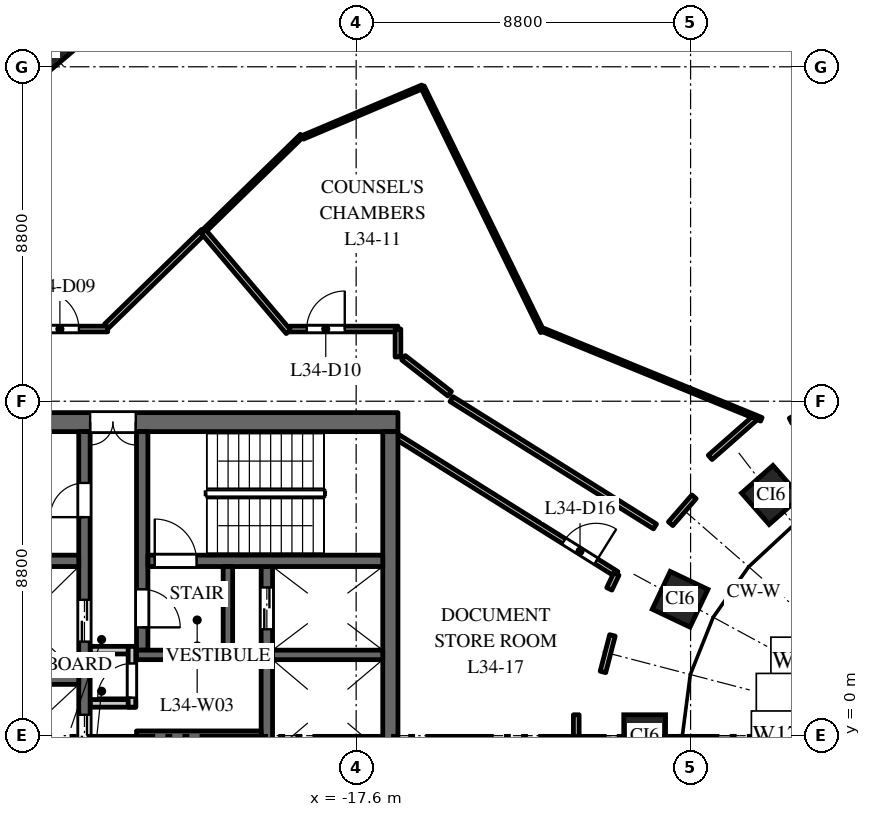
"""IFC4 building model, lengths in metres.
Left out: names, types, materials, properties, quantities, classifications, styles, units other than length and angle.
Written with IfcOpenShell. Run it as: python <this file> out.ifc"""

import sys

from ifc_helpers import new_model, si_unit, direction, frame, frame_2d, origin, origin_2d, place, context, subcontext, project, spatial, rectangle, extrude, element, fill, save


model = new_model("IFC4")
c1 = context("Model", 3, precision=1e-05, world=origin(), true_north=direction((0.0, 1.0)))
c2 = subcontext(c1, "Body", "Model", "MODEL_VIEW")
j1 = project(units=[si_unit("LENGTHUNIT", "METRE"), si_unit("PLANEANGLEUNIT", "RADIAN")], contexts=[c1])
p1 = place(None, origin())
s1 = spatial("IfcSite", under=j1, at=p1, CompositionType="ELEMENT")
p2 = place(p1, origin())
s2 = spatial("IfcBuilding", under=s1, at=p2, CompositionType="ELEMENT")
p3 = place(p2, frame((0.0, 0.0, 150.0)))
s3 = spatial("IfcBuildingStorey", under=s2, at=p3, CompositionType="ELEMENT", Elevation=150.0)
p4 = place(p3, frame((-25.783, 18.18, 0.0), z_axis=(0.0, 0.0, 1.0), x_axis=(-0.763035199656, -0.646356932419, 0.0)))
e1 = element("IfcColumn", 1, at=p4, inside=s3, PredefinedType="COLUMN", context=c2, shape_type="SweptSolid", body=[
    extrude(rectangle(XDim=1.2, YDim=1.2, at=origin_2d()), origin(), (0.0, 0.0, 1.0), 4.0),
])
for number, where, z_axis, x_axis in (
    (2, (-6.682, 6.334, 0.0), (0.0, 0.0, 1.0), (-0.751, -0.66, 0.0)),
    (3, (-9.076, 3.588, 0.0), (0.0, 0.0, 1.0), (-0.429, -0.903, 0.0)),
    (4, (-10.008, 0.0, 0.0), (0.0, 0.0, 1.0), (0.0, -1.0, 0.0)),
):
    element("IfcColumn", number, at=place(p3, frame(where, z_axis=z_axis, x_axis=x_axis)), inside=s3, PredefinedType="COLUMN", context=c2, shape_type="SweptSolid", body=[
        extrude(rectangle(XDim=1.1, YDim=1.1, at=origin_2d()), origin(), (0.0, 0.0, 1.0), 4.0),
    ])
p5 = place(p3, frame((-16.5, 8.25, 0.0), z_axis=(0.0, 0.0, 1.0), x_axis=(-1.0, 0.0, 0.0)))
e5 = element("IfcWall", 5, at=p5, inside=s3, PredefinedType="SHEAR", context=c2, shape_type="SweptSolid", body=[
    extrude(rectangle(XDim=15.0, YDim=0.5, at=frame_2d((7.5, 0.0))), origin(), (0.0, 0.0, 1.0), 3.7),
])
p6 = place(p5, frame((6.9, 0.0, 0.0)))
e6 = element("IfcOpeningElement", 6, at=p6, cuts=e5, PredefinedType="OPENING", context=c2, shape_type="SweptSolid", body=[
    extrude(rectangle(XDim=1.2, YDim=2.1, at=frame_2d((0.6, 1.05))), frame((0.0, 0.26, 0.0), z_axis=(0.0, -1.0, 0.0), x_axis=(1.0, 0.0, 0.0)), (0.0, 0.0, 1.0), 0.52),
])
p7 = place(p5, frame((12.425, 0.0, 0.0)))
e7 = element("IfcOpeningElement", 7, at=p7, cuts=e5, PredefinedType="OPENING", context=c2, shape_type="SweptSolid", body=[
    extrude(rectangle(XDim=0.9, YDim=2.1, at=frame_2d((0.45, 1.05))), frame((0.0, 0.26, 0.0), z_axis=(0.0, -1.0, 0.0), x_axis=(1.0, 0.0, 0.0)), (0.0, 0.0, 1.0), 0.52),
])
p8 = place(p3, frame((-19.95, -4.45, 0.0), z_axis=(0.0, 0.0, 1.0), x_axis=(0.0, 1.0, 0.0)))
e8 = element("IfcWall", 8, at=p8, inside=s3, PredefinedType="SHEAR", context=c2, shape_type="SweptSolid", body=[
    extrude(rectangle(XDim=8.9, YDim=0.3, at=frame_2d((4.45, 0.0))), origin(), (0.0, 0.0, 1.0), 3.7),
])
p9 = place(p8, frame((0.775, 0.0, 0.0)))
e9 = element("IfcOpeningElement", 9, at=p9, cuts=e8, PredefinedType="OPENING", context=c2, shape_type="SweptSolid", body=[
    extrude(rectangle(XDim=1.2, YDim=2.1, at=frame_2d((0.6, 1.05))), frame((0.0, 0.16, 0.0), z_axis=(0.0, -1.0, 0.0), x_axis=(1.0, 0.0, 0.0)), (0.0, 0.0, 1.0), 0.32),
])
p10 = place(p8, frame((7.25, 0.0, 0.0)))
e10 = element("IfcOpeningElement", 10, at=p10, cuts=e8, PredefinedType="OPENING", context=c2, shape_type="SweptSolid", body=[
    extrude(rectangle(XDim=1.1, YDim=2.1, at=frame_2d((0.55, 1.05))), frame((0.0, 0.16, 0.0), z_axis=(0.0, -1.0, 0.0), x_axis=(1.0, 0.0, 0.0)), (0.0, 0.0, 1.0), 0.32),
])
p11 = place(p3, frame((-24.75, -8.0, 0.0), z_axis=(0.0, 0.0, 1.0), x_axis=(0.0, 1.0, 0.0)))
e11 = element("IfcWall", 11, at=p11, inside=s3, PredefinedType="SHEAR", context=c2, shape_type="SweptSolid", body=[
    extrude(rectangle(XDim=16.0, YDim=0.3, at=frame_2d((8.0, 0.0))), origin(), (0.0, 0.0, 1.0), 3.7),
])
p12 = place(p11, frame((4.425, 0.0, 0.0)))
e12 = element("IfcOpeningElement", 12, at=p12, cuts=e11, PredefinedType="OPENING", context=c2, shape_type="SweptSolid", body=[
    extrude(rectangle(XDim=1.1, YDim=2.1, at=frame_2d((0.55, 1.05))), frame((0.0, 0.16, 0.0), z_axis=(0.0, -1.0, 0.0), x_axis=(1.0, 0.0, 0.0)), (0.0, 0.0, 1.0), 0.32),
])
p13 = place(p11, frame((7.45, 0.0, 0.0)))
e13 = element("IfcOpeningElement", 13, at=p13, cuts=e11, PredefinedType="OPENING", context=c2, shape_type="SweptSolid", body=[
    extrude(rectangle(XDim=1.1, YDim=2.1, at=frame_2d((0.55, 1.05))), frame((0.0, 0.16, 0.0), z_axis=(0.0, -1.0, 0.0), x_axis=(1.0, 0.0, 0.0)), (0.0, 0.0, 1.0), 0.32),
])
p14 = place(p11, frame((10.475, 0.0, 0.0)))
e14 = element("IfcOpeningElement", 14, at=p14, cuts=e11, PredefinedType="OPENING", context=c2, shape_type="SweptSolid", body=[
    extrude(rectangle(XDim=1.1, YDim=2.1, at=frame_2d((0.55, 1.05))), frame((0.0, 0.16, 0.0), z_axis=(0.0, -1.0, 0.0), x_axis=(1.0, 0.0, 0.0)), (0.0, 0.0, 1.0), 0.32),
])
p15 = place(p11, frame((13.75, 0.0, 0.0)))
e15 = element("IfcOpeningElement", 15, at=p15, cuts=e11, PredefinedType="OPENING", context=c2, shape_type="SweptSolid", body=[
    extrude(rectangle(XDim=0.9, YDim=2.1, at=frame_2d((0.45, 1.05))), frame((0.0, 0.16, 0.0), z_axis=(0.0, -1.0, 0.0), x_axis=(1.0, 0.0, 0.0)), (0.0, 0.0, 1.0), 0.32),
])
p16 = place(p11, frame((1.975, 0.0, 0.0)))
e16 = element("IfcOpeningElement", 16, at=p16, cuts=e11, PredefinedType="OPENING", context=c2, shape_type="SweptSolid", body=[
    extrude(rectangle(XDim=0.9, YDim=2.1, at=frame_2d((0.45, 1.05))), frame((0.0, 0.16, 0.0), z_axis=(0.0, -1.0, 0.0), x_axis=(1.0, 0.0, 0.0)), (0.0, 0.0, 1.0), 0.32),
])
p17 = place(p11, frame((0.35, 0.0, 0.0)))
e17 = element("IfcOpeningElement", 17, at=p17, cuts=e11, PredefinedType="OPENING", context=c2, shape_type="SweptSolid", body=[
    extrude(rectangle(XDim=0.9, YDim=2.1, at=frame_2d((0.45, 1.05))), frame((0.0, 0.16, 0.0), z_axis=(0.0, -1.0, 0.0), x_axis=(1.0, 0.0, 0.0)), (0.0, 0.0, 1.0), 0.32),
])
p18 = place(p3, frame((-20.1, 0.0, 0.0), z_axis=(0.0, 0.0, 1.0), x_axis=(-1.0, 0.0, 0.0)))
e18 = element("IfcWall", 18, at=p18, inside=s3, PredefinedType="SHEAR", context=c2, shape_type="SweptSolid", body=[
    extrude(rectangle(XDim=3.28, YDim=0.25, at=frame_2d((1.64, 0.0))), origin(), (0.0, 0.0, 1.0), 3.7),
])
p19 = place(p3, frame((-16.7, -8.0, 0.0), z_axis=(0.0, 0.0, 1.0), x_axis=(0.0, 1.0, 0.0)))
e19 = element("IfcWall", 19, at=p19, inside=s3, PredefinedType="SHEAR", context=c2, shape_type="SweptSolid", body=[
    extrude(rectangle(XDim=16.0, YDim=0.4, at=frame_2d((8.0, 0.0))), origin(), (0.0, 0.0, 1.0), 3.7),
])
for number, where, z_axis, x_axis in (
    (20, (-23.4, 0.85, 0.0), (0.0, 0.0, 1.0), (-1.0, 0.0, 0.0)),
    (21, (-23.4, 2.25, 0.0), (0.0, 0.0, 1.0), (-1.0, 0.0, 0.0)),
):
    element("IfcWall", number, at=place(p3, frame(where, z_axis=z_axis, x_axis=x_axis)), inside=s3, PredefinedType="PARTITIONING", context=c2, shape_type="SweptSolid", body=[
        extrude(rectangle(XDim=1.2, YDim=0.2, at=frame_2d((0.6, 0.0))), origin(), (0.0, 0.0, 1.0), 3.7),
    ])
p20 = place(p3, frame((-23.5, 0.75, 0.0), z_axis=(0.0, 0.0, 1.0), x_axis=(0.0, 1.0, 0.0)))
e22 = element("IfcWall", 22, at=p20, inside=s3, PredefinedType="PARTITIONING", context=c2, shape_type="SweptSolid", body=[
    extrude(rectangle(XDim=1.6, YDim=0.2, at=frame_2d((0.8, 0.0))), origin(), (0.0, 0.0, 1.0), 3.7),
])
p21 = place(p20, frame((0.25, 0.0, 0.0)))
e23 = element("IfcOpeningElement", 23, at=p21, cuts=e22, PredefinedType="OPENING", context=c2, shape_type="SweptSolid", body=[
    extrude(rectangle(XDim=0.9, YDim=2.1, at=frame_2d((0.45, 1.05))), frame((0.0, 0.11, 0.0), z_axis=(0.0, -1.0, 0.0), x_axis=(1.0, 0.0, 0.0)), (0.0, 0.0, 1.0), 0.22),
])
p22 = place(p3, frame((-24.9, 4.6, 0.0), z_axis=(0.0, 0.0, 1.0), x_axis=(-1.0, 0.0, 0.0)))
e24 = element("IfcWall", 24, at=p22, inside=s3, PredefinedType="SHEAR", context=c2, shape_type="SweptSolid", body=[
    extrude(rectangle(XDim=6.1, YDim=0.3, at=frame_2d((3.05, 0.0))), origin(), (0.0, 0.0, 1.0), 3.7),
])
p23 = place(p22, frame((4.2, 0.0, 0.0)))
e25 = element("IfcOpeningElement", 25, at=p23, cuts=e24, PredefinedType="OPENING", context=c2, shape_type="SweptSolid", body=[
    extrude(rectangle(XDim=0.9, YDim=2.1, at=frame_2d((0.45, 1.05))), frame((0.0, 0.16, 0.0), z_axis=(0.0, -1.0, 0.0), x_axis=(1.0, 0.0, 0.0)), (0.0, 0.0, 1.0), 0.32),
])
for number, where, z_axis, x_axis in (
    (26, (-16.9, 2.125, 0.0), (0.0, 0.0, 1.0), (-1.0, 0.0, 0.0)),
    (27, (-24.9, 1.475, 0.0), (0.0, 0.0, 1.0), (-1.0, 0.0, 0.0)),
):
    element("IfcWall", number, at=place(p3, frame(where, z_axis=z_axis, x_axis=x_axis)), inside=s3, PredefinedType="SHEAR", context=c2, shape_type="SweptSolid", body=[
        extrude(rectangle(XDim=2.9, YDim=0.25, at=frame_2d((1.45, 0.0))), origin(), (0.0, 0.0, 1.0), 3.7),
    ])
p24 = place(p3, frame((-23.23, 2.25, 0.0), z_axis=(0.0, 0.0, 1.0), x_axis=(0.0, 1.0, 0.0)))
e28 = element("IfcWall", 28, at=p24, inside=s3, PredefinedType="SHEAR", context=c2, shape_type="SweptSolid", body=[
    extrude(rectangle(XDim=5.75, YDim=0.3, at=frame_2d((2.875, 0.0))), origin(), (0.0, 0.0, 1.0), 3.7),
])
p25 = place(p24, frame((0.6, 0.0, 0.0)))
e29 = element("IfcOpeningElement", 29, at=p25, cuts=e28, PredefinedType="OPENING", context=c2, shape_type="SweptSolid", body=[
    extrude(rectangle(XDim=1.0, YDim=2.1, at=frame_2d((0.5, 1.05))), frame((0.0, 0.16, 0.0), z_axis=(0.0, -1.0, 0.0), x_axis=(1.0, 0.0, 0.0)), (0.0, 0.0, 1.0), 0.32),
])
p26 = place(p3, frame((-16.9, 4.6, 0.0), z_axis=(0.0, 0.0, 1.0), x_axis=(-1.0, 0.0, 0.0)))
e30 = element("IfcWall", 30, at=p26, inside=s3, PredefinedType="SHEAR", context=c2, shape_type="SweptSolid", body=[
    extrude(rectangle(XDim=6.18, YDim=0.3, at=frame_2d((3.09, 0.0))), origin(), (0.0, 0.0, 1.0), 3.7),
])
p27 = place(p26, frame((4.9, 0.0, 0.0)))
e31 = element("IfcOpeningElement", 31, at=p27, cuts=e30, PredefinedType="OPENING", context=c2, shape_type="SweptSolid", body=[
    extrude(rectangle(XDim=1.1, YDim=2.1, at=frame_2d((0.55, 1.05))), frame((0.0, 0.16, 0.0), z_axis=(0.0, -1.0, 0.0), x_axis=(1.0, 0.0, 0.0)), (0.0, 0.0, 1.0), 0.32),
])
p28 = place(p3, frame((-20.85, 2.125, 0.0), z_axis=(0.0, 0.0, 1.0), x_axis=(-1.0, 0.0, 0.0)))
e32 = element("IfcWall", 32, at=p28, inside=s3, PredefinedType="SHEAR", context=c2, shape_type="SweptSolid", body=[
    extrude(rectangle(XDim=2.53, YDim=0.25, at=frame_2d((1.265, 0.0))), origin(), (0.0, 0.0, 1.0), 3.7),
])
p29 = place(p3, frame((-20.975, 2.25, 0.0), z_axis=(0.0, 0.0, 1.0), x_axis=(0.0, 1.0, 0.0)))
e33 = element("IfcWall", 33, at=p29, inside=s3, PredefinedType="SHEAR", context=c2, shape_type="SweptSolid", body=[
    extrude(rectangle(XDim=2.2, YDim=0.25, at=frame_2d((1.1, 0.0))), origin(), (0.0, 0.0, 1.0), 3.7),
])
p30 = place(p3, frame((-31.5, 10.7, 0.0), z_axis=(0.0, 0.0, 1.0), x_axis=(1.0, 0.0, 0.0)))
e34 = element("IfcWall", 34, at=p30, inside=s3, PredefinedType="PARTITIONING", context=c2, shape_type="SweptSolid", body=[
    extrude(rectangle(XDim=7.361, YDim=0.15, at=frame_2d((3.681, 0.0))), origin(), (0.0, 0.0, 1.0), 3.1),
])
p31 = place(p30, frame((5.604, 0.0, 0.0)))
e35 = element("IfcOpeningElement", 35, at=p31, cuts=e34, PredefinedType="OPENING", context=c2, shape_type="SweptSolid", body=[
    extrude(rectangle(XDim=1.0, YDim=2.1, at=frame_2d((0.5, 1.05))), frame((0.0, 0.085, 0.0), z_axis=(0.0, -1.0, 0.0), x_axis=(1.0, 0.0, 0.0)), (0.0, 0.0, 1.0), 0.17),
])
p32 = place(p3, frame((-24.166, 10.778, 0.0), z_axis=(0.0, 0.0, 1.0), x_axis=(0.715930732039, 0.698171316313, 0.0)))
e36 = element("IfcWall", 36, at=p32, inside=s3, PredefinedType="PARTITIONING", context=c2, shape_type="SweptSolid", body=[
    extrude(rectangle(XDim=3.561, YDim=0.15, at=frame_2d((1.78, 0.0))), origin(), (0.0, 0.0, 1.0), 3.7),
])
p33 = place(p3, frame((-21.618, 13.265, 0.0), z_axis=(0.0, 0.0, 1.0), x_axis=(0.716003517179, 0.69809667195, 0.0)))
e37 = element("IfcWall", 37, at=p33, inside=s3, PredefinedType="PARTITIONING", context=c2, shape_type="SweptSolid", body=[
    extrude(rectangle(XDim=3.613, YDim=0.1, at=frame_2d((1.807, 0.0))), origin(), (0.0, 0.0, 1.0), 2.75),
])
p34 = place(p3, frame((-21.617, 13.264, 0.0), z_axis=(0.0, 0.0, 1.0), x_axis=(0.646521695402, -0.762895600574, 0.0)))
e38 = element("IfcWall", 38, at=p34, inside=s3, PredefinedType="PARTITIONING", context=c2, shape_type="SweptSolid", body=[
    extrude(rectangle(XDim=3.455, YDim=0.15, at=frame_2d((1.728, 0.0))), origin(), (0.0, 0.0, 1.0), 3.7),
])
p35 = place(p3, frame((-19.347, 10.7, 0.0), z_axis=(0.0, 0.0, 1.0), x_axis=(1.0, 0.0, 0.0)))
e39 = element("IfcWall", 39, at=p35, inside=s3, PredefinedType="PARTITIONING", context=c2, shape_type="SweptSolid", body=[
    extrude(rectangle(XDim=2.847, YDim=0.15, at=frame_2d((1.423, 0.0))), origin(), (0.0, 0.0, 1.0), 3.7),
])
p36 = place(p35, frame((0.447, 0.0, 0.0)))
e40 = element("IfcOpeningElement", 40, at=p36, cuts=e39, PredefinedType="OPENING", context=c2, shape_type="SweptSolid", body=[
    extrude(rectangle(XDim=1.0, YDim=2.1, at=frame_2d((0.5, 1.05))), frame((0.0, 0.085, 0.0), z_axis=(0.0, -1.0, 0.0), x_axis=(1.0, 0.0, 0.0)), (0.0, 0.0, 1.0), 0.17),
])
p37 = place(p3, frame((-19.003, 15.744, 0.0), z_axis=(0.0, 0.0, 1.0), x_axis=(0.921193815687, 0.389104039995, 0.0)))
e41 = element("IfcWall", 41, at=p37, inside=s3, PredefinedType="PARTITIONING", context=c2, shape_type="SweptSolid", body=[
    extrude(rectangle(XDim=3.418, YDim=0.1, at=frame_2d((1.709, 0.0))), origin(), (0.0, 0.0, 1.0), 3.7),
])
p38 = place(p3, frame((-16.5, 9.964, 0.0), z_axis=(0.0, 0.0, 1.0), x_axis=(0.0, 1.0, 0.0)))
e42 = element("IfcWall", 42, at=p38, inside=s3, PredefinedType="PARTITIONING", context=c2, shape_type="SweptSolid", body=[
    extrude(rectangle(XDim=0.736, YDim=0.15, at=frame_2d((0.368, 0.0))), origin(), (0.0, 0.0, 1.0), 3.7),
])
p39 = place(p3, frame((-15.854, 17.074, 0.0), z_axis=(0.0, 0.0, 1.0), x_axis=(0.439232714934, -0.898373320024, 0.0)))
e43 = element("IfcWall", 43, at=p39, inside=s3, PredefinedType="PARTITIONING", context=c2, shape_type="SweptSolid", body=[
    extrude(rectangle(XDim=7.174, YDim=0.1, at=frame_2d((3.587, 0.0))), origin(), (0.0, 0.0, 1.0), 3.7),
])
p40 = place(p3, frame((-16.5, 7.851, 0.0), z_axis=(0.0, 0.0, 1.0), x_axis=(0.847690706888, -0.530490777917, 0.0)))
e44 = element("IfcWall", 44, at=p40, inside=s3, PredefinedType="PARTITIONING", context=c2, shape_type="SweptSolid", body=[
    extrude(rectangle(XDim=6.781, YDim=0.15, at=frame_2d((3.39, 0.0))), origin(), (0.0, 0.0, 1.0), 3.7),
])
p41 = place(p40, frame((5.151, 0.0, 0.0)))
e45 = element("IfcOpeningElement", 45, at=p41, cuts=e44, PredefinedType="OPENING", context=c2, shape_type="SweptSolid", body=[
    extrude(rectangle(XDim=1.0, YDim=2.1, at=frame_2d((0.5, 1.05))), frame((0.0, 0.085, 0.0), z_axis=(0.0, -1.0, 0.0), x_axis=(1.0, 0.0, 0.0)), (0.0, 0.0, 1.0), 0.17),
])
p42 = place(p3, frame((-15.089, 8.856, 0.0), z_axis=(0.0, 0.0, 1.0), x_axis=(0.847611500167, -0.53061732424, 0.0)))
e46 = element("IfcWall", 46, at=p42, inside=s3, PredefinedType="PARTITIONING", context=c2, shape_type="SweptSolid", body=[
    extrude(rectangle(XDim=6.315, YDim=0.15, at=frame_2d((3.158, 0.0))), origin(), (0.0, 0.0, 1.0), 3.7),
])
p43 = place(p3, frame((-12.666, 10.669, 0.0), z_axis=(0.0, 0.0, 1.0), x_axis=(0.925451421732, -0.378866290416, 0.0)))
e47 = element("IfcWall", 47, at=p43, inside=s3, PredefinedType="PARTITIONING", context=c2, shape_type="SweptSolid", body=[
    extrude(rectangle(XDim=6.189, YDim=0.1, at=frame_2d((3.095, 0.0))), origin(), (0.0, 0.0, 1.0), 3.7),
])
p44 = place(p3, frame((-11.808, -0.55, 0.0), z_axis=(0.0, 0.0, 1.0), x_axis=(0.0, 1.0, 0.0)))
e48 = element("IfcWall", 48, at=p44, inside=s3, PredefinedType="PARTITIONING", context=c2, shape_type="SweptSolid", body=[
    extrude(rectangle(XDim=1.1, YDim=0.15, at=frame_2d((0.55, 0.0))), origin(), (0.0, 0.0, 1.0), 3.7),
])
p45 = place(p3, frame((-11.106, 1.677, 0.0), z_axis=(0.0, 0.0, 1.0), x_axis=(0.251541813796, 0.967846431988, 0.0)))
e49 = element("IfcWall", 49, at=p45, inside=s3, PredefinedType="PARTITIONING", context=c2, shape_type="SweptSolid", body=[
    extrude(rectangle(XDim=0.994, YDim=0.15, at=frame_2d((0.497, 0.0))), origin(), (0.0, 0.0, 1.0), 3.7),
])
p46 = place(p3, frame((-10.938, 3.863, 0.0), z_axis=(0.0, 0.0, 1.0), x_axis=(0.429758433873, 0.90294390109, 0.0)))
e50 = element("IfcWall", 50, at=p46, inside=s3, PredefinedType="PARTITIONING", context=c2, shape_type="SweptSolid", body=[
    extrude(rectangle(XDim=0.433, YDim=0.15, at=frame_2d((0.216, 0.0))), origin(), (0.0, 0.0, 1.0), 3.7),
])
p47 = place(p3, frame((-9.325, 5.577, 0.0), z_axis=(0.0, 0.0, 1.0), x_axis=(0.656365478363, 0.754443078578, 0.0)))
e51 = element("IfcWall", 51, at=p47, inside=s3, PredefinedType="PARTITIONING", context=c2, shape_type="SweptSolid", body=[
    extrude(rectangle(XDim=0.938, YDim=0.15, at=frame_2d((0.469, 0.0))), origin(), (0.0, 0.0, 1.0), 2.75),
])
p48 = place(p3, frame((-8.284, 7.322, 0.0), z_axis=(0.0, 0.0, 1.0), x_axis=(0.750666784408, 0.660680996235, 0.0)))
e52 = element("IfcWall", 52, at=p48, inside=s3, PredefinedType="PARTITIONING", context=c2, shape_type="SweptSolid", body=[
    extrude(rectangle(XDim=1.555, YDim=0.15, at=frame_2d((0.777, 0.0))), origin(), (0.0, 0.0, 1.0), 3.7),
])
p49 = place(p3, frame((-6.168, 8.287, 0.0), z_axis=(0.0, 0.0, 1.0), x_axis=(0.889398654128, 0.457132403178, 0.0)))
e53 = element("IfcWall", 53, at=p49, inside=s3, PredefinedType="PARTITIONING", context=c2, shape_type="SweptSolid", body=[
    extrude(rectangle(XDim=0.844, YDim=0.15, at=frame_2d((0.422, 0.0))), origin(), (0.0, 0.0, 1.0), 3.7),
])
p50 = place(p3, frame((-16.352, 9.942, 0.0), z_axis=(0.0, 0.0, 1.0), x_axis=(0.788950226826, -0.614457109643, 0.0)))
e54 = element("IfcWall", 54, at=p50, inside=s3, PredefinedType="PARTITIONING", context=c2, shape_type="SweptSolid", body=[
    extrude(rectangle(XDim=1.538, YDim=0.15, at=frame_2d((0.769, 0.0))), origin(), (0.0, 0.0, 1.0), 3.7),
])
p51 = place(p10, origin())
e55 = element("IfcDoor", 55, at=p51, inside=s3, OperationType="DOUBLE_DOOR_SLIDING", PredefinedType="DOOR", context=c2, shape_type="SweptSolid", body=[
    extrude(rectangle(XDim=1.1, YDim=2.1, at=frame_2d((0.55, 1.05))), frame((0.0, 0.025, 0.0), z_axis=(0.0, -1.0, 0.0), x_axis=(1.0, 0.0, 0.0)), (0.0, 0.0, 1.0), 0.05),
])
fill(e10, e55)
p52 = place(p13, origin())
e56 = element("IfcDoor", 56, at=p52, inside=s3, OperationType="DOUBLE_DOOR_SLIDING", PredefinedType="DOOR", context=c2, shape_type="SweptSolid", body=[
    extrude(rectangle(XDim=1.1, YDim=2.1, at=frame_2d((0.55, 1.05))), frame((0.0, 0.025, 0.0), z_axis=(0.0, -1.0, 0.0), x_axis=(1.0, 0.0, 0.0)), (0.0, 0.0, 1.0), 0.05),
])
fill(e13, e56)
p53 = place(p14, origin())
e57 = element("IfcDoor", 57, at=p53, inside=s3, OperationType="DOUBLE_DOOR_SLIDING", PredefinedType="DOOR", context=c2, shape_type="SweptSolid", body=[
    extrude(rectangle(XDim=1.1, YDim=2.1, at=frame_2d((0.55, 1.05))), frame((0.0, 0.025, 0.0), z_axis=(0.0, -1.0, 0.0), x_axis=(1.0, 0.0, 0.0)), (0.0, 0.0, 1.0), 0.05),
])
fill(e14, e57)
p54 = place(p27, origin())
e58 = element("IfcDoor", 58, at=p54, inside=s3, OperationType="SINGLE_SWING_RIGHT", PredefinedType="DOOR", context=c2, shape_type="SweptSolid", body=[
    extrude(rectangle(XDim=1.1, YDim=2.1, at=frame_2d((0.55, 1.05))), frame((0.0, 0.025, 0.0), z_axis=(0.0, -1.0, 0.0), x_axis=(1.0, 0.0, 0.0)), (0.0, 0.0, 1.0), 0.05),
])
fill(e31, e58)
p55 = place(p25, origin())
e59 = element("IfcDoor", 59, at=p55, inside=s3, OperationType="SINGLE_SWING_LEFT", PredefinedType="DOOR", context=c2, shape_type="SweptSolid", body=[
    extrude(rectangle(XDim=1.0, YDim=2.1, at=frame_2d((0.5, 1.05))), frame((0.0, 0.025, 0.0), z_axis=(0.0, -1.0, 0.0), x_axis=(1.0, 0.0, 0.0)), (0.0, 0.0, 1.0), 0.05),
])
fill(e29, e59)
p56 = place(p6, origin())
e60 = element("IfcDoor", 60, at=p56, inside=s3, OperationType="DOUBLE_DOOR_DOUBLE_SWING", PredefinedType="DOOR", context=c2, shape_type="SweptSolid", body=[
    extrude(rectangle(XDim=1.2, YDim=2.1, at=frame_2d((0.6, 1.05))), frame((0.0, 0.025, 0.0), z_axis=(0.0, -1.0, 0.0), x_axis=(1.0, 0.0, 0.0)), (0.0, 0.0, 1.0), 0.05),
])
fill(e6, e60)
p57 = place(p15, origin())
e61 = element("IfcDoor", 61, at=p57, inside=s3, OperationType="SINGLE_SWING_RIGHT", PredefinedType="DOOR", context=c2, shape_type="SweptSolid", body=[
    extrude(rectangle(XDim=0.9, YDim=2.1, at=frame_2d((0.45, 1.05))), frame((0.0, 0.025, 0.0), z_axis=(0.0, -1.0, 0.0), x_axis=(1.0, 0.0, 0.0)), (0.0, 0.0, 1.0), 0.05),
])
fill(e15, e61)
p58 = place(p21, origin())
e62 = element("IfcDoor", 62, at=p58, inside=s3, OperationType="SINGLE_SWING_RIGHT", PredefinedType="DOOR", context=c2, shape_type="SweptSolid", body=[
    extrude(rectangle(XDim=0.9, YDim=2.1, at=frame_2d((0.45, 1.05))), frame((0.0, 0.025, 0.0), z_axis=(0.0, -1.0, 0.0), x_axis=(1.0, 0.0, 0.0)), (0.0, 0.0, 1.0), 0.05),
])
fill(e23, e62)
p59 = place(p31, origin())
e63 = element("IfcDoor", 63, at=p59, inside=s3, OperationType="SINGLE_SWING_LEFT", PredefinedType="DOOR", context=c2, shape_type="SweptSolid", body=[
    extrude(rectangle(XDim=1.0, YDim=2.1, at=frame_2d((0.5, 1.05))), frame((0.0, 0.025, 0.0), z_axis=(0.0, -1.0, 0.0), x_axis=(1.0, 0.0, 0.0)), (0.0, 0.0, 1.0), 0.05),
])
fill(e35, e63)
p60 = place(p36, origin())
e64 = element("IfcDoor", 64, at=p60, inside=s3, OperationType="SINGLE_SWING_RIGHT", PredefinedType="DOOR", context=c2, shape_type="SweptSolid", body=[
    extrude(rectangle(XDim=1.0, YDim=2.1, at=frame_2d((0.5, 1.05))), frame((0.0, 0.025, 0.0), z_axis=(0.0, -1.0, 0.0), x_axis=(1.0, 0.0, 0.0)), (0.0, 0.0, 1.0), 0.05),
])
fill(e40, e64)
p61 = place(p41, origin())
e65 = element("IfcDoor", 65, at=p61, inside=s3, OperationType="SINGLE_SWING_RIGHT", PredefinedType="DOOR", context=c2, shape_type="SweptSolid", body=[
    extrude(rectangle(XDim=1.0, YDim=2.1, at=frame_2d((0.5, 1.05))), frame((0.0, 0.025, 0.0), z_axis=(0.0, -1.0, 0.0), x_axis=(1.0, 0.0, 0.0)), (0.0, 0.0, 1.0), 0.05),
])
fill(e45, e65)
save(model, sys.argv[1])
